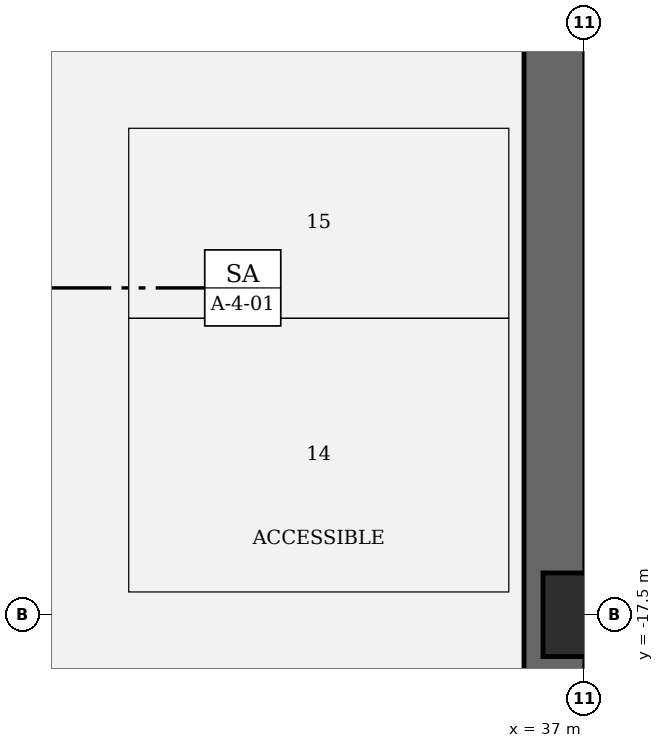
"""IFC4 building model, lengths in metres.
Left out: names, types, materials, properties, quantities, classifications, styles, units other than length and angle.
Written with IfcOpenShell. Run it as: python <this file> out.ifc"""

import sys

from ifc_helpers import new_model, si_unit, direction, frame, frame_2d, origin, origin_2d, place, context, subcontext, project, spatial, rectangle, extrude, element, save


model = new_model("IFC4")
c1 = context("Model", 3, precision=1e-05, world=origin(), true_north=direction((0.0, 1.0)))
c2 = subcontext(c1, "Body", "Model", "MODEL_VIEW")
j1 = project(units=[si_unit("LENGTHUNIT", "METRE"), si_unit("PLANEANGLEUNIT", "RADIAN")], contexts=[c1])
p1 = place(None, origin())
s1 = spatial("IfcSite", under=j1, at=p1, CompositionType="ELEMENT")
p2 = place(p1, origin())
s2 = spatial("IfcBuilding", under=s1, at=p2, CompositionType="ELEMENT")
p3 = place(p2, frame((0.0, 0.0, -4.8)))
s3 = spatial("IfcBuildingStorey", under=s2, at=p3, CompositionType="ELEMENT", Elevation=-4.8)
p4 = place(p3, frame((37.0, -17.5, 0.0), z_axis=(0.0, 0.0, 1.0), x_axis=(1.0, 0.0, 0.0)))
e1 = element("IfcColumn", 1, at=p4, inside=s3, PredefinedType="COLUMN", context=c2, shape_type="SweptSolid", body=[
    extrude(rectangle(XDim=1.1, YDim=1.1, at=origin_2d()), origin(), (0.0, 0.0, 1.0), 4.8),
])
p5 = place(p3, frame((36.6, 24.2, 0.0), z_axis=(0.0, 0.0, 1.0), x_axis=(0.0, -1.0, 0.0)))
e2 = element("IfcWall", 2, at=p5, inside=s3, PredefinedType="USERDEFINED", context=c2, shape_type="SweptSolid", body=[
    extrude(rectangle(XDim=48.4, YDim=0.8, at=frame_2d((24.2, 0.0))), origin(), (0.0, 0.0, 1.0), 4.8),
])
save(model, sys.argv[1])
